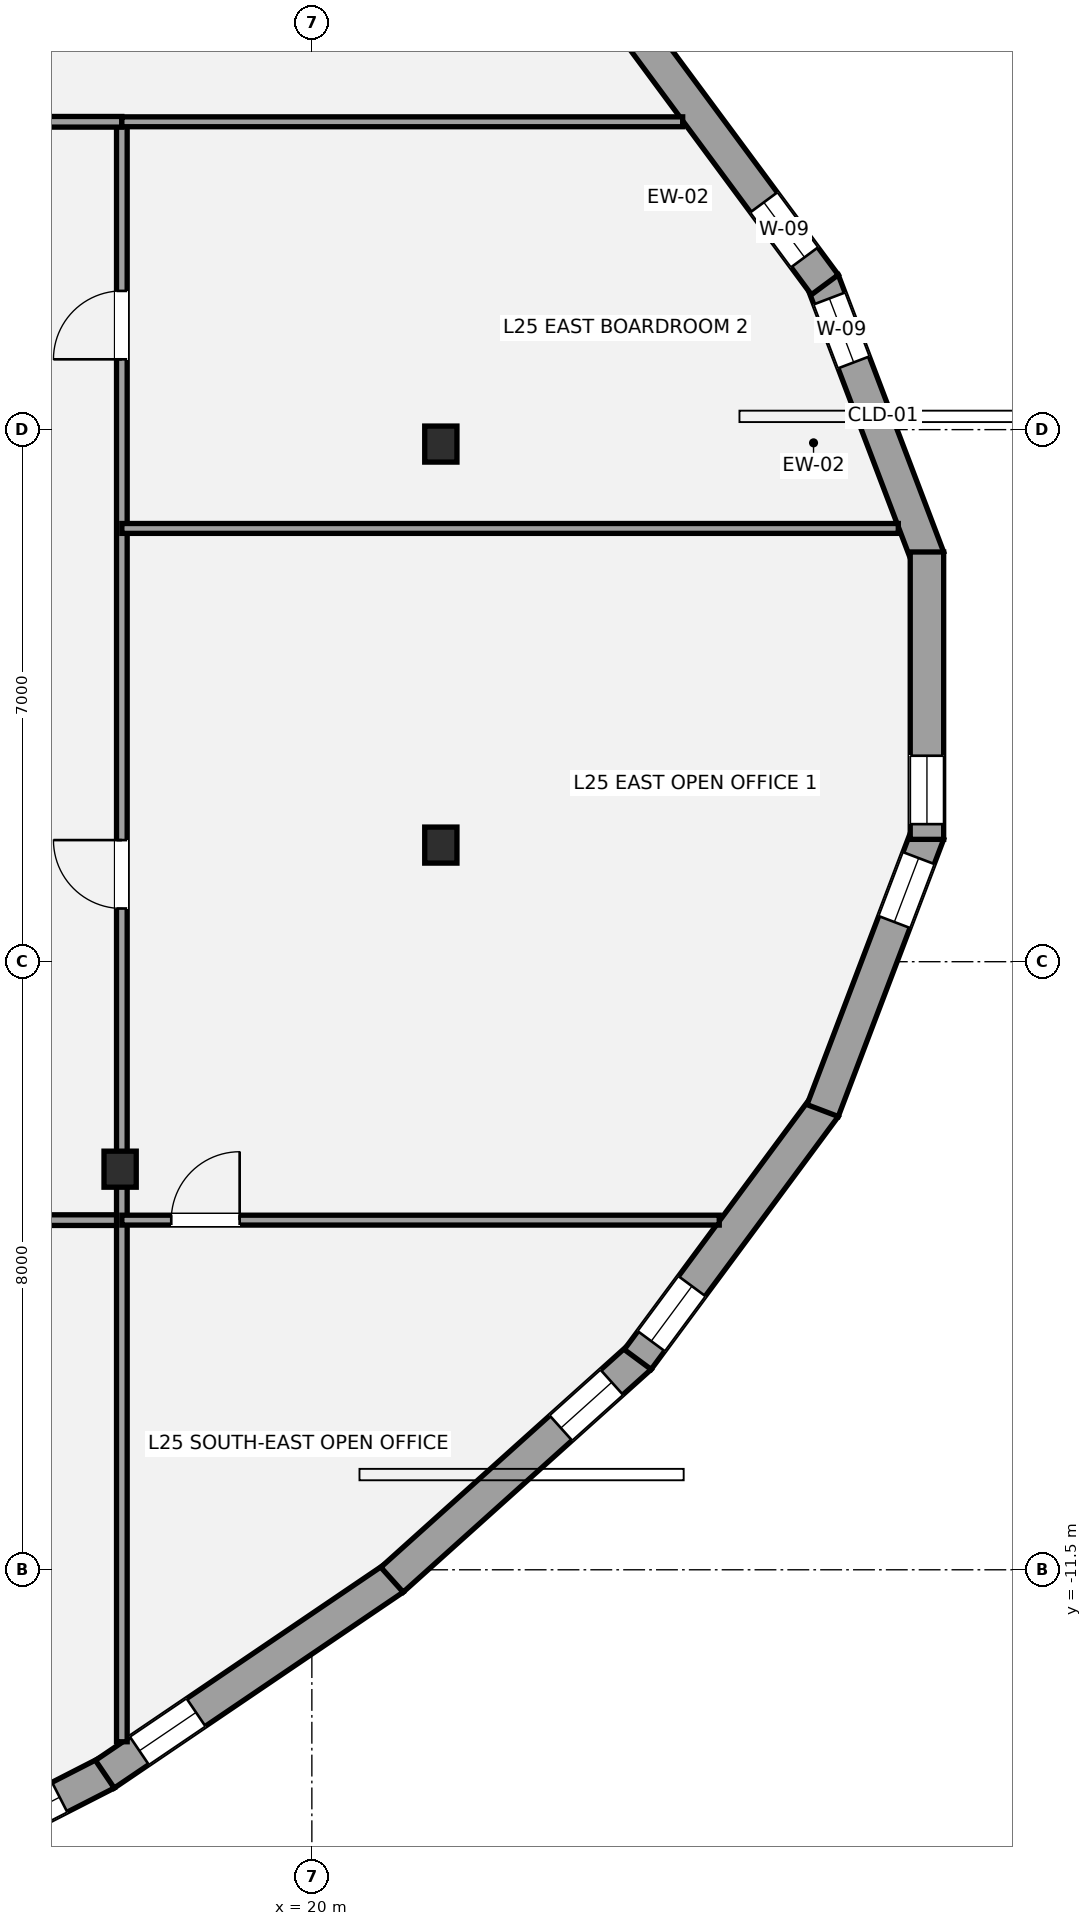
"""IFC4 building model, lengths in metres.
Left out: names, types, materials, properties, quantities, classifications, styles, units other than length and angle.
Written with IfcOpenShell. Run it as: python <this file> out.ifc"""

import sys

from ifc_helpers import new_model, si_unit, direction, frame, frame_2d, origin, origin_2d, place, context, subcontext, project, spatial, rectangle, i_section, extrude, element, fill, save


model = new_model("IFC4")
c1 = context("Model", 3, precision=1e-05, world=origin(), true_north=direction((0.0, 1.0)))
c2 = subcontext(c1, "Body", "Model", "MODEL_VIEW")
j1 = project(units=[si_unit("LENGTHUNIT", "METRE"), si_unit("PLANEANGLEUNIT", "RADIAN")], contexts=[c1])
p1 = place(None, origin())
s1 = spatial("IfcSite", under=j1, at=p1, CompositionType="ELEMENT")
p2 = place(p1, origin())
s2 = spatial("IfcBuilding", under=s1, at=p2, CompositionType="ELEMENT")
p3 = place(p2, frame((0.0, 0.0, 96.6)))
s3 = spatial("IfcBuildingStorey", under=s2, at=p3, CompositionType="ELEMENT", Elevation=96.6)
for number, where, z_axis, x_axis in (
    (1, (21.697, 3.31, 0.0), (0.0, 0.0, 1.0), (1.0, 0.0, 0.0)),
    (2, (17.477, -6.229, 0.0), (0.0, 0.0, 1.0), (1.0, 0.0, 0.0)),
    (3, (21.697, -1.966, 0.0), (0.0, 0.0, 1.0), (1.0, 0.0, 0.0)),
):
    element("IfcColumn", number, at=place(p3, frame(where, z_axis=z_axis, x_axis=x_axis)), inside=s3, PredefinedType="COLUMN", context=c2, shape_type="SweptSolid", body=[
        extrude(i_section(OverallWidth=0.424, OverallDepth=0.474, WebThickness=0.048, FlangeThickness=0.077, at=origin_2d()), origin(), (0.0, 0.0, 1.0), 3.5),
    ])
p4 = place(p3, frame((26.72, 5.458, 0.0), z_axis=(0.0, 0.0, 1.0), x_axis=(0.355453982488, -0.93469378212, 0.0)))
e4 = element("IfcWall", 4, at=p4, inside=s3, PredefinedType="STANDARD", context=c2, shape_type="SweptSolid", body=[
    extrude(rectangle(XDim=3.901, YDim=0.44, at=frame_2d((1.951, 0.0))), origin(), (0.0, 0.0, 1.0), 2.528),
])
p5 = place(p4, frame((0.249, 0.0, 0.42)))
e5 = element("IfcOpeningElement", 5, at=p5, cuts=e4, PredefinedType="OPENING", context=c2, shape_type="SweptSolid", body=[
    extrude(rectangle(XDim=0.9, YDim=1.35, at=frame_2d((0.45, 0.675))), frame((0.0, 0.23, 0.0), z_axis=(0.0, -1.0, 0.0), x_axis=(1.0, 0.0, 0.0)), (0.0, 0.0, 1.0), 0.46),
])
p6 = place(p3, frame((24.287, 8.733, 0.0), z_axis=(0.0, 0.0, 1.0), x_axis=(0.594853677057, -0.803834002075, 0.0)))
e6 = element("IfcWall", 6, at=p6, inside=s3, PredefinedType="STANDARD", context=c2, shape_type="SweptSolid", body=[
    extrude(rectangle(XDim=4.139, YDim=0.44, at=frame_2d((2.07, 0.0))), origin(), (0.0, 0.0, 1.0), 2.528),
])
p7 = place(p6, frame((2.79, 0.0, 0.58)))
e7 = element("IfcOpeningElement", 7, at=p7, cuts=e6, PredefinedType="OPENING", context=c2, shape_type="SweptSolid", body=[
    extrude(rectangle(XDim=0.9, YDim=1.35, at=frame_2d((0.45, 0.675))), frame((0.0, 0.23, 0.0), z_axis=(0.0, -1.0, 0.0), x_axis=(1.0, 0.0, 0.0)), (0.0, 0.0, 1.0), 0.46),
])
p8 = place(p3, frame((17.3, -14.176, 0.0), z_axis=(0.0, 0.0, 1.0), x_axis=(-0.890297461787, -0.455379434687, 0.0)))
e8 = element("IfcWall", 8, at=p8, inside=s3, PredefinedType="STANDARD", context=c2, shape_type="SweptSolid", body=[
    extrude(rectangle(XDim=4.856, YDim=0.44, at=frame_2d((2.428, 0.0))), origin(), (0.0, 0.0, 1.0), 2.528),
])
p9 = place(p8, frame((0.694, 0.0, 0.58)))
e9 = element("IfcOpeningElement", 9, at=p9, cuts=e8, PredefinedType="OPENING", context=c2, shape_type="SweptSolid", body=[
    extrude(rectangle(XDim=0.9, YDim=1.35, at=frame_2d((0.45, 0.675))), frame((0.0, 0.23, 0.0), z_axis=(0.0, -1.0, 0.0), x_axis=(1.0, 0.0, 0.0)), (0.0, 0.0, 1.0), 0.46),
])
p10 = place(p3, frame((21.078, -11.613, 0.0), z_axis=(0.0, 0.0, 1.0), x_axis=(-0.827740300315, -0.561111392893, 0.0)))
e10 = element("IfcWall", 10, at=p10, inside=s3, PredefinedType="STANDARD", context=c2, shape_type="SweptSolid", body=[
    extrude(rectangle(XDim=4.593, YDim=0.44, at=frame_2d((2.296, 0.0))), origin(), (0.0, 0.0, 1.0), 2.528),
])
p11 = place(p10, frame((3.144, 0.0, 0.58)))
e11 = element("IfcOpeningElement", 11, at=p11, cuts=e10, PredefinedType="OPENING", context=c2, shape_type="SweptSolid", body=[
    extrude(rectangle(XDim=0.9, YDim=1.35, at=frame_2d((0.45, 0.675))), frame((0.0, 0.23, 0.0), z_axis=(0.0, -1.0, 0.0), x_axis=(1.0, 0.0, 0.0)), (0.0, 0.0, 1.0), 0.46),
])
p12 = place(p3, frame((24.317, -8.7, 0.0), z_axis=(0.0, 0.0, 1.0), x_axis=(-0.743897322515, -0.668293927516, 0.0)))
e12 = element("IfcWall", 12, at=p12, inside=s3, PredefinedType="STANDARD", context=c2, shape_type="SweptSolid", body=[
    extrude(rectangle(XDim=4.385, YDim=0.44, at=frame_2d((2.193, 0.0))), origin(), (0.0, 0.0, 1.0), 2.528),
])
p13 = place(p12, frame((0.499, 0.0, 0.58)))
e13 = element("IfcOpeningElement", 13, at=p13, cuts=e12, PredefinedType="OPENING", context=c2, shape_type="SweptSolid", body=[
    extrude(rectangle(XDim=0.9, YDim=1.35, at=frame_2d((0.45, 0.675))), frame((0.0, 0.23, 0.0), z_axis=(0.0, -1.0, 0.0), x_axis=(1.0, 0.0, 0.0)), (0.0, 0.0, 1.0), 0.46),
])
p14 = place(p3, frame((26.749, -5.406, 0.0), z_axis=(0.0, 0.0, 1.0), x_axis=(-0.594853677057, -0.803834002075, 0.0)))
e14 = element("IfcWall", 14, at=p14, inside=s3, PredefinedType="STANDARD", context=c2, shape_type="SweptSolid", body=[
    extrude(rectangle(XDim=4.139, YDim=0.44, at=frame_2d((2.07, 0.0))), origin(), (0.0, 0.0, 1.0), 2.528),
])
p15 = place(p14, frame((2.939, 0.0, 0.58)))
e15 = element("IfcOpeningElement", 15, at=p15, cuts=e14, PredefinedType="OPENING", context=c2, shape_type="SweptSolid", body=[
    extrude(rectangle(XDim=0.9, YDim=1.35, at=frame_2d((0.45, 0.675))), frame((0.0, 0.23, 0.0), z_axis=(0.0, -1.0, 0.0), x_axis=(1.0, 0.0, 0.0)), (0.0, 0.0, 1.0), 0.46),
])
p16 = place(p3, frame((28.107, -1.812, 0.0), z_axis=(0.0, 0.0, 1.0), x_axis=(-0.355453982488, -0.93469378212, 0.0)))
e16 = element("IfcWall", 16, at=p16, inside=s3, PredefinedType="STANDARD", context=c2, shape_type="SweptSolid", body=[
    extrude(rectangle(XDim=3.901, YDim=0.44, at=frame_2d((1.951, 0.0))), origin(), (0.0, 0.0, 1.0), 2.528),
])
p17 = place(p16, frame((0.347, 0.0, 0.58)))
e17 = element("IfcOpeningElement", 17, at=p17, cuts=e16, PredefinedType="OPENING", context=c2, shape_type="SweptSolid", body=[
    extrude(rectangle(XDim=0.9, YDim=1.35, at=frame_2d((0.45, 0.675))), frame((0.0, 0.23, 0.0), z_axis=(0.0, -1.0, 0.0), x_axis=(1.0, 0.0, 0.0)), (0.0, 0.0, 1.0), 0.46),
])
p18 = place(p3, frame((28.093, 1.89, 0.0), z_axis=(0.0, 0.0, 1.0), x_axis=(0.0, -1.0, 0.0)))
e18 = element("IfcWall", 18, at=p18, inside=s3, PredefinedType="STANDARD", context=c2, shape_type="SweptSolid", body=[
    extrude(rectangle(XDim=3.781, YDim=0.44, at=frame_2d((1.89, 0.0))), origin(), (0.0, 0.0, 1.0), 2.528),
])
p19 = place(p18, frame((2.681, 0.0, 0.58)))
e19 = element("IfcOpeningElement", 19, at=p19, cuts=e18, PredefinedType="OPENING", context=c2, shape_type="SweptSolid", body=[
    extrude(rectangle(XDim=0.9, YDim=1.35, at=frame_2d((0.45, 0.675))), frame((0.0, 0.23, 0.0), z_axis=(0.0, -1.0, 0.0), x_axis=(1.0, 0.0, 0.0)), (0.0, 0.0, 1.0), 0.46),
])
p20 = place(p3, frame((-15.7, -6.9, 0.0), z_axis=(0.0, 0.0, 1.0), x_axis=(1.0, 0.0, 0.0)))
e20 = element("IfcWall", 20, at=p20, inside=s3, PredefinedType="PARTITIONING", context=c2, shape_type="SweptSolid", body=[
    extrude(rectangle(XDim=33.2, YDim=0.14, at=frame_2d((16.6, 0.0))), origin(), (0.0, 0.0, 1.0), 2.688),
])
p21 = place(p20, frame((3.15, 0.0, 0.0)))
e21 = element("IfcOpeningElement", 21, at=p21, cuts=e20, PredefinedType="OPENING", context=c2, shape_type="SweptSolid", body=[
    extrude(rectangle(XDim=0.9, YDim=2.1, at=frame_2d((0.45, 1.05))), frame((0.0, 0.08, 0.0), z_axis=(0.0, -1.0, 0.0), x_axis=(1.0, 0.0, 0.0)), (0.0, 0.0, 1.0), 0.16),
])
p22 = place(p20, frame((11.0, 0.0, 0.0)))
e22 = element("IfcOpeningElement", 22, at=p22, cuts=e20, PredefinedType="OPENING", context=c2, shape_type="SweptSolid", body=[
    extrude(rectangle(XDim=0.9, YDim=2.1, at=frame_2d((0.45, 1.05))), frame((0.0, 0.08, 0.0), z_axis=(0.0, -1.0, 0.0), x_axis=(1.0, 0.0, 0.0)), (0.0, 0.0, 1.0), 0.16),
])
p23 = place(p20, frame((19.5, 0.0, 0.0)))
e23 = element("IfcOpeningElement", 23, at=p23, cuts=e20, PredefinedType="OPENING", context=c2, shape_type="SweptSolid", body=[
    extrude(rectangle(XDim=0.9, YDim=2.1, at=frame_2d((0.45, 1.05))), frame((0.0, 0.08, 0.0), z_axis=(0.0, -1.0, 0.0), x_axis=(1.0, 0.0, 0.0)), (0.0, 0.0, 1.0), 0.16),
])
p24 = place(p20, frame((27.95, 0.0, 0.0)))
e24 = element("IfcOpeningElement", 24, at=p24, cuts=e20, PredefinedType="OPENING", context=c2, shape_type="SweptSolid", body=[
    extrude(rectangle(XDim=1.5, YDim=2.15, at=frame_2d((0.75, 1.075))), frame((0.0, 0.08, 0.0), z_axis=(0.0, -1.0, 0.0), x_axis=(1.0, 0.0, 0.0)), (0.0, 0.0, 1.0), 0.16),
])
p25 = place(p3, frame((17.5, -13.763, 0.0), z_axis=(0.0, 0.0, 1.0), x_axis=(0.0, 1.0, 0.0)))
e25 = element("IfcWall", 25, at=p25, inside=s3, PredefinedType="PARTITIONING", context=c2, shape_type="SweptSolid", body=[
    extrude(rectangle(XDim=21.313, YDim=0.14, at=frame_2d((10.656, 0.0))), origin(), (0.0, 0.0, 1.0), 2.688),
])
p26 = place(p25, frame((10.963, 0.0, 0.0)))
e26 = element("IfcOpeningElement", 26, at=p26, cuts=e25, PredefinedType="OPENING", context=c2, shape_type="SweptSolid", body=[
    extrude(rectangle(XDim=0.9, YDim=2.1, at=frame_2d((0.45, 1.05))), frame((0.0, 0.08, 0.0), z_axis=(0.0, -1.0, 0.0), x_axis=(1.0, 0.0, 0.0)), (0.0, 0.0, 1.0), 0.16),
])
p27 = place(p25, frame((18.188, 0.0, 0.0)))
e27 = element("IfcOpeningElement", 27, at=p27, cuts=e25, PredefinedType="OPENING", context=c2, shape_type="SweptSolid", body=[
    extrude(rectangle(XDim=0.9, YDim=2.1, at=frame_2d((0.45, 1.05))), frame((0.0, 0.08, 0.0), z_axis=(0.0, -1.0, 0.0), x_axis=(1.0, 0.0, 0.0)), (0.0, 0.0, 1.0), 0.16),
])
p28 = place(p3, frame((13.9, 7.55, 0.0), z_axis=(0.0, 0.0, 1.0), x_axis=(1.0, 0.0, 0.0)))
e28 = element("IfcWall", 28, at=p28, inside=s3, PredefinedType="PARTITIONING", context=c2, shape_type="SweptSolid", body=[
    extrude(rectangle(XDim=3.6, YDim=0.14, at=frame_2d((1.8, 0.0))), origin(), (0.0, 0.0, 1.0), 2.763),
])
p29 = place(p28, frame((0.32, 0.0, 0.0)))
e29 = element("IfcOpeningElement", 29, at=p29, cuts=e28, PredefinedType="OPENING", context=c2, shape_type="SweptSolid", body=[
    extrude(rectangle(XDim=0.92, YDim=2.15, at=frame_2d((0.46, 1.075))), frame((0.0, 0.08, 0.0), z_axis=(0.0, -1.0, 0.0), x_axis=(1.0, 0.0, 0.0)), (0.0, 0.0, 1.0), 0.16),
])
p30 = place(p3, frame((17.5, 7.55, 0.0), z_axis=(0.0, 0.0, 1.0), x_axis=(1.0, 0.0, 0.0)))
e30 = element("IfcWall", 30, at=p30, inside=s3, PredefinedType="PARTITIONING", context=c2, shape_type="SweptSolid", body=[
    extrude(rectangle(XDim=7.379, YDim=0.13, at=frame_2d((3.689, 0.0))), origin(), (0.0, 0.0, 1.0), 2.763),
])
p31 = place(p3, frame((17.5, -6.9, 0.0), z_axis=(0.0, 0.0, 1.0), x_axis=(1.0, 0.0, 0.0)))
e31 = element("IfcWall", 31, at=p31, inside=s3, PredefinedType="PARTITIONING", context=c2, shape_type="SweptSolid", body=[
    extrude(rectangle(XDim=7.86, YDim=0.13, at=frame_2d((3.93, 0.0))), origin(), (0.0, 0.0, 1.0), 3.31),
])
p32 = place(p31, frame((0.65, 0.0, 0.0)))
e32 = element("IfcOpeningElement", 32, at=p32, cuts=e31, PredefinedType="OPENING", context=c2, shape_type="SweptSolid", body=[
    extrude(rectangle(XDim=0.9, YDim=2.1, at=frame_2d((0.45, 1.05))), frame((0.0, 0.075, 0.0), z_axis=(0.0, -1.0, 0.0), x_axis=(1.0, 0.0, 0.0)), (0.0, 0.0, 1.0), 0.15),
])
p33 = place(p3, frame((17.5, 2.2, 0.0), z_axis=(0.0, 0.0, 1.0), x_axis=(1.0, 0.0, 0.0)))
e33 = element("IfcWall", 33, at=p33, inside=s3, PredefinedType="PARTITIONING", context=c2, shape_type="SweptSolid", body=[
    extrude(rectangle(XDim=10.216, YDim=0.13, at=frame_2d((5.108, 0.0))), origin(), (0.0, 0.0, 1.0), 2.751),
])
p34 = place(p5, origin())
e34 = element("IfcWindow", 34, at=p34, inside=s3, PartitioningType="SINGLE_PANEL", PredefinedType="WINDOW", context=c2, shape_type="SweptSolid", body=[
    extrude(rectangle(XDim=0.9, YDim=1.35, at=frame_2d((0.45, 0.675))), frame((0.0, -0.01, 0.0), z_axis=(0.0, -1.0, 0.0), x_axis=(1.0, 0.0, 0.0)), (0.0, 0.0, 1.0), 0.06),
])
fill(e5, e34)
p35 = place(p7, origin())
e35 = element("IfcWindow", 35, at=p35, inside=s3, PartitioningType="SINGLE_PANEL", PredefinedType="WINDOW", context=c2, shape_type="SweptSolid", body=[
    extrude(rectangle(XDim=0.9, YDim=1.35, at=frame_2d((0.45, 0.675))), frame((0.0, -0.01, 0.0), z_axis=(0.0, -1.0, 0.0), x_axis=(1.0, 0.0, 0.0)), (0.0, 0.0, 1.0), 0.06),
])
fill(e7, e35)
p36 = place(p9, origin())
e36 = element("IfcWindow", 36, at=p36, inside=s3, PartitioningType="SINGLE_PANEL", PredefinedType="WINDOW", context=c2, shape_type="SweptSolid", body=[
    extrude(rectangle(XDim=0.9, YDim=1.35, at=frame_2d((0.45, 0.675))), frame((0.0, -0.01, 0.0), z_axis=(0.0, -1.0, 0.0), x_axis=(1.0, 0.0, 0.0)), (0.0, 0.0, 1.0), 0.06),
])
fill(e9, e36)
p37 = place(p11, origin())
e37 = element("IfcWindow", 37, at=p37, inside=s3, PartitioningType="SINGLE_PANEL", PredefinedType="WINDOW", context=c2, shape_type="SweptSolid", body=[
    extrude(rectangle(XDim=0.9, YDim=1.35, at=frame_2d((0.45, 0.675))), frame((0.0, -0.01, 0.0), z_axis=(0.0, -1.0, 0.0), x_axis=(1.0, 0.0, 0.0)), (0.0, 0.0, 1.0), 0.06),
])
fill(e11, e37)
p38 = place(p13, origin())
e38 = element("IfcWindow", 38, at=p38, inside=s3, PartitioningType="SINGLE_PANEL", PredefinedType="WINDOW", context=c2, shape_type="SweptSolid", body=[
    extrude(rectangle(XDim=0.9, YDim=1.35, at=frame_2d((0.45, 0.675))), frame((0.0, -0.01, 0.0), z_axis=(0.0, -1.0, 0.0), x_axis=(1.0, 0.0, 0.0)), (0.0, 0.0, 1.0), 0.06),
])
fill(e13, e38)
p39 = place(p15, origin())
e39 = element("IfcWindow", 39, at=p39, inside=s3, PartitioningType="SINGLE_PANEL", PredefinedType="WINDOW", context=c2, shape_type="SweptSolid", body=[
    extrude(rectangle(XDim=0.9, YDim=1.35, at=frame_2d((0.45, 0.675))), frame((0.0, -0.01, 0.0), z_axis=(0.0, -1.0, 0.0), x_axis=(1.0, 0.0, 0.0)), (0.0, 0.0, 1.0), 0.06),
])
fill(e15, e39)
p40 = place(p17, origin())
e40 = element("IfcWindow", 40, at=p40, inside=s3, PartitioningType="SINGLE_PANEL", PredefinedType="WINDOW", context=c2, shape_type="SweptSolid", body=[
    extrude(rectangle(XDim=0.9, YDim=1.35, at=frame_2d((0.45, 0.675))), frame((0.0, -0.01, 0.0), z_axis=(0.0, -1.0, 0.0), x_axis=(1.0, 0.0, 0.0)), (0.0, 0.0, 1.0), 0.06),
])
fill(e17, e40)
p41 = place(p19, origin())
e41 = element("IfcWindow", 41, at=p41, inside=s3, PartitioningType="SINGLE_PANEL", PredefinedType="WINDOW", context=c2, shape_type="SweptSolid", body=[
    extrude(rectangle(XDim=0.9, YDim=1.35, at=frame_2d((0.45, 0.675))), frame((0.0, -0.01, 0.0), z_axis=(0.0, -1.0, 0.0), x_axis=(1.0, 0.0, 0.0)), (0.0, 0.0, 1.0), 0.06),
])
fill(e19, e41)
p42 = place(p32, origin())
e42 = element("IfcDoor", 42, at=p42, inside=s3, OperationType="SINGLE_SWING_RIGHT", PredefinedType="DOOR", context=c2, shape_type="SweptSolid", body=[
    extrude(rectangle(XDim=0.9, YDim=2.1, at=frame_2d((0.45, 1.05))), frame((0.0, 0.025, 0.0), z_axis=(0.0, -1.0, 0.0), x_axis=(1.0, 0.0, 0.0)), (0.0, 0.0, 1.0), 0.05),
])
fill(e32, e42)
p43 = place(p26, origin())
e43 = element("IfcDoor", 43, at=p43, inside=s3, OperationType="SINGLE_SWING_RIGHT", PredefinedType="DOOR", context=c2, shape_type="SweptSolid", body=[
    extrude(rectangle(XDim=0.9, YDim=2.1, at=frame_2d((0.45, 1.05))), frame((0.0, 0.025, 0.0), z_axis=(0.0, -1.0, 0.0), x_axis=(1.0, 0.0, 0.0)), (0.0, 0.0, 1.0), 0.05),
])
fill(e26, e43)
p44 = place(p27, origin())
e44 = element("IfcDoor", 44, at=p44, inside=s3, OperationType="SINGLE_SWING_LEFT", PredefinedType="DOOR", context=c2, shape_type="SweptSolid", body=[
    extrude(rectangle(XDim=0.9, YDim=2.1, at=frame_2d((0.45, 1.05))), frame((0.0, 0.025, 0.0), z_axis=(0.0, -1.0, 0.0), x_axis=(1.0, 0.0, 0.0)), (0.0, 0.0, 1.0), 0.05),
])
fill(e27, e44)
save(model, sys.argv[1])
